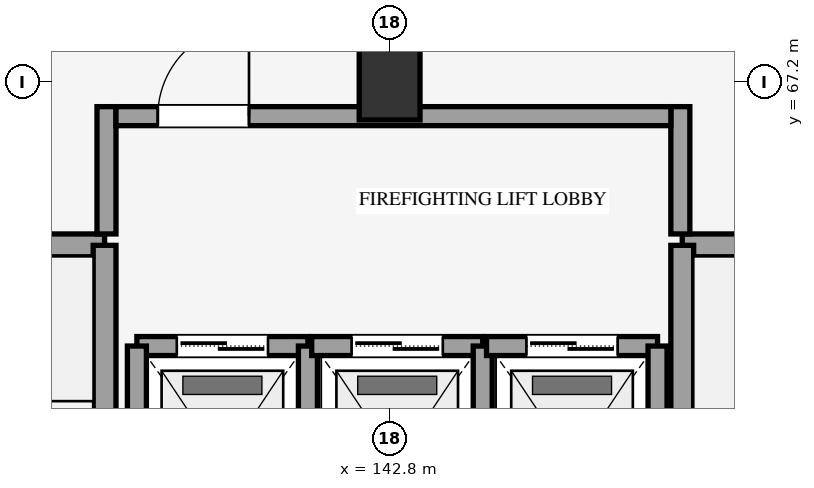
"""IFC4 building model, lengths in metres.
Left out: names, types, materials, properties, quantities, classifications, styles, units other than length and angle.
Written with IfcOpenShell. Run it as: python <this file> out.ifc"""

import sys

from ifc_helpers import new_model, si_unit, direction, frame, frame_2d, origin, origin_2d, place, context, subcontext, project, spatial, rectangle, extrude, element, fill, save


model = new_model("IFC4")
c1 = context("Model", 3, precision=1e-05, world=origin(), true_north=direction((0.0, 1.0)))
c2 = subcontext(c1, "Body", "Model", "MODEL_VIEW")
j1 = project(units=[si_unit("LENGTHUNIT", "METRE"), si_unit("PLANEANGLEUNIT", "RADIAN")], contexts=[c1])
p1 = place(None, origin())
s1 = spatial("IfcSite", under=j1, at=p1, CompositionType="ELEMENT")
p2 = place(p1, origin())
s2 = spatial("IfcBuilding", under=s1, at=p2, CompositionType="ELEMENT")
p3 = place(p2, frame((0.0, 0.0, 65.7)))
s3 = spatial("IfcBuildingStorey", under=s2, at=p3, CompositionType="ELEMENT", Elevation=65.7)
p4 = place(p3, frame((142.8, 67.2, 0.0), z_axis=(0.0, 0.0, 1.0), x_axis=(1.0, 0.0, 0.0)))
e1 = element("IfcColumn", 1, at=p4, inside=s3, PredefinedType="COLUMN", context=c2, shape_type="SweptSolid", body=[
    extrude(rectangle(XDim=0.8, YDim=1.0, at=origin_2d()), origin(), (0.0, 0.0, 1.0), 4.2),
])
p5 = place(p3, frame((135.05, 65.05, 0.0), z_axis=(0.0, 0.0, 1.0), x_axis=(1.0, 0.0, 0.0)))
e2 = element("IfcWall", 2, at=p5, inside=s3, PredefinedType="SHEAR", context=c2, shape_type="SweptSolid", body=[
    extrude(rectangle(XDim=4.0, YDim=0.3, at=frame_2d((2.0, 0.0))), origin(), (0.0, 0.0, 1.0), 4.2),
])
p6 = place(p3, frame((139.05, 50.75, 0.0), z_axis=(0.0, 0.0, 1.0), x_axis=(0.0, 1.0, 0.0)))
e3 = element("IfcWall", 3, at=p6, inside=s3, PredefinedType="SHEAR", context=c2, shape_type="SweptSolid", body=[
    extrude(rectangle(XDim=14.3, YDim=0.3, at=frame_2d((7.15, 0.0))), origin(), (0.0, 0.0, 1.0), 4.2),
])
p7 = place(p3, frame((146.65, 65.05, 0.0), z_axis=(0.0, 0.0, 1.0), x_axis=(1.0, 0.0, 0.0)))
e4 = element("IfcWall", 4, at=p7, inside=s3, PredefinedType="SHEAR", context=c2, shape_type="SweptSolid", body=[
    extrude(rectangle(XDim=4.0, YDim=0.3, at=frame_2d((2.0, 0.0))), origin(), (0.0, 0.0, 1.0), 4.2),
])
p8 = place(p3, frame((146.65, 50.75, 0.0), z_axis=(0.0, 0.0, 1.0), x_axis=(0.0, 1.0, 0.0)))
e5 = element("IfcWall", 5, at=p8, inside=s3, PredefinedType="SHEAR", context=c2, shape_type="SweptSolid", body=[
    extrude(rectangle(XDim=14.3, YDim=0.3, at=frame_2d((7.15, 0.0))), origin(), (0.0, 0.0, 1.0), 4.2),
])
p9 = place(p3, frame((139.475, 63.725, 0.0), z_axis=(0.0, 0.0, 1.0), x_axis=(1.0, 0.0, 0.0)))
e6 = element("IfcWall", 6, at=p9, inside=s3, PredefinedType="SHEAR", context=c2, shape_type="SweptSolid", body=[
    extrude(rectangle(XDim=2.25, YDim=0.25, at=frame_2d((1.125, 0.0))), origin(), (0.0, 0.0, 1.0), 3.96),
])
p10 = place(p9, frame((0.525, 0.0, 0.0)))
e7 = element("IfcOpeningElement", 7, at=p10, cuts=e6, PredefinedType="OPENING", context=c2, shape_type="SweptSolid", body=[
    extrude(rectangle(XDim=1.2, YDim=2.18, at=frame_2d((0.6, 1.09))), frame((0.0, 0.135, 0.0), z_axis=(0.0, -1.0, 0.0), x_axis=(1.0, 0.0, 0.0)), (0.0, 0.0, 1.0), 0.27),
])
for number, where, z_axis, x_axis in (
    (8, (139.475, 60.675, 0.0), (0.0, 0.0, 1.0), (0.0, 1.0, 0.0)),
    (9, (141.725, 60.675, 0.0), (0.0, 0.0, 1.0), (0.0, 1.0, 0.0)),
):
    element("IfcWall", number, at=place(p3, frame(where, z_axis=z_axis, x_axis=x_axis)), inside=s3, PredefinedType="SHEAR", context=c2, shape_type="SweptSolid", body=[
        extrude(rectangle(XDim=3.05, YDim=0.25, at=frame_2d((1.525, 0.0))), origin(), (0.0, 0.0, 1.0), 3.96),
    ])
p11 = place(p3, frame((141.775, 63.725, 0.0), z_axis=(0.0, 0.0, 1.0), x_axis=(1.0, 0.0, 0.0)))
e10 = element("IfcWall", 10, at=p11, inside=s3, PredefinedType="SHEAR", context=c2, shape_type="SweptSolid", body=[
    extrude(rectangle(XDim=2.25, YDim=0.25, at=frame_2d((1.125, 0.0))), origin(), (0.0, 0.0, 1.0), 3.96),
])
p12 = place(p11, frame((0.525, 0.0, 0.0)))
e11 = element("IfcOpeningElement", 11, at=p12, cuts=e10, PredefinedType="OPENING", context=c2, shape_type="SweptSolid", body=[
    extrude(rectangle(XDim=1.2, YDim=2.18, at=frame_2d((0.6, 1.09))), frame((0.0, 0.135, 0.0), z_axis=(0.0, -1.0, 0.0), x_axis=(1.0, 0.0, 0.0)), (0.0, 0.0, 1.0), 0.27),
])
p13 = place(p3, frame((144.025, 60.675, 0.0), z_axis=(0.0, 0.0, 1.0), x_axis=(0.0, 1.0, 0.0)))
e12 = element("IfcWall", 12, at=p13, inside=s3, PredefinedType="SHEAR", context=c2, shape_type="SweptSolid", body=[
    extrude(rectangle(XDim=3.05, YDim=0.25, at=frame_2d((1.525, 0.0))), origin(), (0.0, 0.0, 1.0), 3.96),
])
p14 = place(p3, frame((144.075, 63.725, 0.0), z_axis=(0.0, 0.0, 1.0), x_axis=(1.0, 0.0, 0.0)))
e13 = element("IfcWall", 13, at=p14, inside=s3, PredefinedType="SHEAR", context=c2, shape_type="SweptSolid", body=[
    extrude(rectangle(XDim=2.25, YDim=0.25, at=frame_2d((1.125, 0.0))), origin(), (0.0, 0.0, 1.0), 3.96),
])
p15 = place(p14, frame((0.525, 0.0, 0.0)))
e14 = element("IfcOpeningElement", 14, at=p15, cuts=e13, PredefinedType="OPENING", context=c2, shape_type="SweptSolid", body=[
    extrude(rectangle(XDim=1.2, YDim=2.18, at=frame_2d((0.6, 1.09))), frame((0.0, 0.135, 0.0), z_axis=(0.0, -1.0, 0.0), x_axis=(1.0, 0.0, 0.0)), (0.0, 0.0, 1.0), 0.27),
])
p16 = place(p3, frame((146.325, 60.675, 0.0), z_axis=(0.0, 0.0, 1.0), x_axis=(0.0, 1.0, 0.0)))
e15 = element("IfcWall", 15, at=p16, inside=s3, PredefinedType="SHEAR", context=c2, shape_type="SweptSolid", body=[
    extrude(rectangle(XDim=3.05, YDim=0.25, at=frame_2d((1.525, 0.0))), origin(), (0.0, 0.0, 1.0), 3.96),
])
for number, where, z_axis, x_axis in (
    (16, (139.075, 65.2, 0.0), (0.0, 0.0, 1.0), (0.0, 1.0, 0.0)),
    (17, (146.625, 65.2, 0.0), (0.0, 0.0, 1.0), (0.0, 1.0, 0.0)),
):
    element("IfcWall", number, at=place(p3, frame(where, z_axis=z_axis, x_axis=x_axis)), inside=s3, PredefinedType="SHEAR", context=c2, shape_type="SweptSolid", body=[
        extrude(rectangle(XDim=1.675, YDim=0.25, at=frame_2d((0.837, 0.0))), origin(), (0.0, 0.0, 1.0), 3.96),
    ])
p17 = place(p3, frame((139.2, 66.75, 0.0), z_axis=(0.0, 0.0, 1.0), x_axis=(1.0, 0.0, 0.0)))
e18 = element("IfcWall", 18, at=p17, inside=s3, PredefinedType="SHEAR", context=c2, shape_type="SweptSolid", body=[
    extrude(rectangle(XDim=7.3, YDim=0.25, at=frame_2d((3.65, 0.0))), origin(), (0.0, 0.0, 1.0), 3.96),
])
p18 = place(p17, frame((0.55, 0.0, 0.0)))
e19 = element("IfcOpeningElement", 19, at=p18, cuts=e18, PredefinedType="OPENING", context=c2, shape_type="SweptSolid", body=[
    extrude(rectangle(XDim=1.2, YDim=2.15, at=frame_2d((0.6, 1.075))), frame((0.0, 0.135, 0.0), z_axis=(0.0, -1.0, 0.0), x_axis=(1.0, 0.0, 0.0)), (0.0, 0.0, 1.0), 0.27),
])
p19 = place(p10, origin())
e20 = element("IfcDoor", 20, at=p19, inside=s3, OperationType="DOUBLE_DOOR_SLIDING", PredefinedType="DOOR", context=c2, shape_type="SweptSolid", body=[
    extrude(rectangle(XDim=1.2, YDim=2.18, at=frame_2d((0.6, 1.09))), frame((0.0, 0.025, 0.0), z_axis=(0.0, -1.0, 0.0), x_axis=(1.0, 0.0, 0.0)), (0.0, 0.0, 1.0), 0.05),
])
fill(e7, e20)
p20 = place(p12, origin())
e21 = element("IfcDoor", 21, at=p20, inside=s3, OperationType="DOUBLE_DOOR_SLIDING", PredefinedType="DOOR", context=c2, shape_type="SweptSolid", body=[
    extrude(rectangle(XDim=1.2, YDim=2.18, at=frame_2d((0.6, 1.09))), frame((0.0, 0.025, 0.0), z_axis=(0.0, -1.0, 0.0), x_axis=(1.0, 0.0, 0.0)), (0.0, 0.0, 1.0), 0.05),
])
fill(e11, e21)
p21 = place(p15, origin())
e22 = element("IfcDoor", 22, at=p21, inside=s3, OperationType="DOUBLE_DOOR_SLIDING", PredefinedType="DOOR", context=c2, shape_type="SweptSolid", body=[
    extrude(rectangle(XDim=1.2, YDim=2.18, at=frame_2d((0.6, 1.09))), frame((0.0, 0.025, 0.0), z_axis=(0.0, -1.0, 0.0), x_axis=(1.0, 0.0, 0.0)), (0.0, 0.0, 1.0), 0.05),
])
fill(e14, e22)
p22 = place(p18, origin())
e23 = element("IfcDoor", 23, at=p22, inside=s3, OperationType="SINGLE_SWING_RIGHT", PredefinedType="DOOR", context=c2, shape_type="SweptSolid", body=[
    extrude(rectangle(XDim=1.2, YDim=2.15, at=frame_2d((0.6, 1.075))), frame((0.0, 0.025, 0.0), z_axis=(0.0, -1.0, 0.0), x_axis=(1.0, 0.0, 0.0)), (0.0, 0.0, 1.0), 0.05),
])
fill(e19, e23)
save(model, sys.argv[1])
